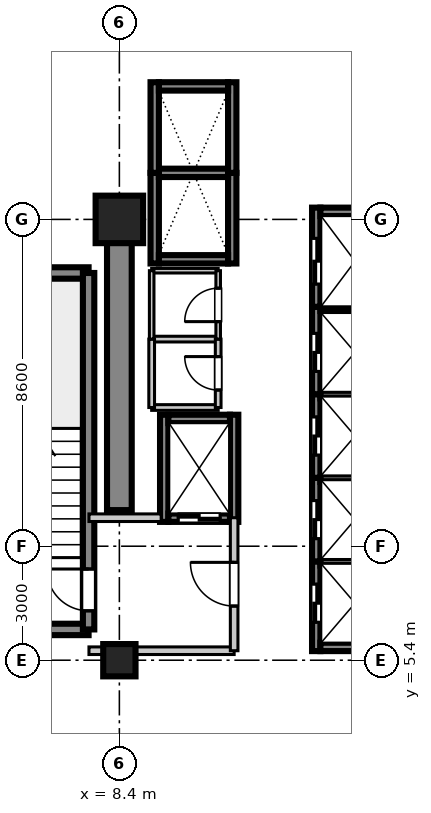
"""IFC4 building model, lengths in metres.
Left out: names, types, materials, properties, quantities, classifications, styles, units other than length and angle.
Written with IfcOpenShell. Run it as: python <this file> out.ifc"""

import sys

from ifc_helpers import new_model, si_unit, direction, frame, frame_2d, origin, origin_2d, place, context, subcontext, project, spatial, rectangle, extrude, source, transform, mapped, element, fill, save


model = new_model("IFC4")
c1 = context("Model", 3, precision=1e-05, world=origin(), true_north=direction((0.0, 1.0)))
c2 = subcontext(c1, "Body", "Model", "MODEL_VIEW")
j1 = project(units=[si_unit("LENGTHUNIT", "METRE"), si_unit("PLANEANGLEUNIT", "RADIAN")], contexts=[c1])
p1 = place(None, origin())
s1 = spatial("IfcSite", under=j1, at=p1, CompositionType="ELEMENT")
p2 = place(p1, origin())
s2 = spatial("IfcBuilding", under=s1, at=p2, CompositionType="ELEMENT")
p3 = place(p2, frame((0.0, 0.0, 117.5)))
s3 = spatial("IfcBuildingStorey", under=s2, at=p3, CompositionType="ELEMENT", Elevation=117.5)
m1 = source(origin(), c2, "Body", "SweptSolid", [
    extrude(rectangle(XDim=0.85, YDim=0.85, at=origin_2d()), origin(), (0.0, 0.0, 1.0), 3.605),
])
p4 = place(p3, frame((8.4, 5.4, 0.0), z_axis=(0.0, 0.0, 1.0), x_axis=(1.0, 0.0, 0.0)))
e1 = element("IfcColumn", 1, at=p4, inside=s3, PredefinedType="PILASTER", context=c2, shape_type="MappedRepresentation", body=[
    mapped(m1, transform((0.0, 0.0, 0.0), scale=1.0)),
])
m2 = source(origin(), c2, "Body", "SweptSolid", [
    extrude(rectangle(XDim=1.25, YDim=1.25, at=origin_2d()), origin(), (0.0, 0.0, 1.0), 3.605),
])
p5 = place(p3, frame((8.4, 17.0, 0.0), z_axis=(0.0, 0.0, 1.0), x_axis=(1.0, 0.0, 0.0)))
e2 = element("IfcColumn", 2, at=p5, inside=s3, PredefinedType="COLUMN", context=c2, shape_type="MappedRepresentation", body=[
    mapped(m2, transform((0.0, 0.0, 0.0), scale=1.0)),
])
m3 = source(origin(), c2, "Body", "SweptSolid", [
    extrude(rectangle(XDim=7.65, YDim=0.65, at=frame_2d((3.825, 0.0))), origin(), (0.0, 0.0, 1.0), 3.38),
])
p6 = place(p3, frame((8.4, 9.35, 0.0), z_axis=(0.0, 0.0, 1.0), x_axis=(0.0, 1.0, 0.0)))
e3 = element("IfcWall", 3, at=p6, inside=s3, PredefinedType="SHEAR", context=c2, shape_type="MappedRepresentation", body=[
    mapped(m3, transform((0.0, 0.0, 0.0), scale=1.0)),
])
m4 = source(origin(), c2, "Body", "SweptSolid", [
    extrude(rectangle(XDim=3.98, YDim=0.3, at=frame_2d((1.99, 0.0))), origin(), (0.0, 0.0, 1.0), 3.38),
])
for number, where, z_axis, x_axis in (
    (4, (3.61, 6.21, 0.0), (0.0, 0.0, 1.0), (1.0, 0.0, 0.0)),
    (5, (3.61, 15.59, 0.0), (0.0, 0.0, 1.0), (1.0, 0.0, 0.0)),
):
    element("IfcWall", number, at=place(p3, frame(where, z_axis=z_axis, x_axis=x_axis)), inside=s3, PredefinedType="SHEAR", context=c2, shape_type="MappedRepresentation", body=[
        mapped(m4, transform((0.0, 0.0, 0.0), scale=1.0)),
    ])
m5 = source(origin(), c2, "Body", "SweptSolid", [
    extrude(rectangle(XDim=9.38, YDim=0.3, at=frame_2d((4.69, 0.0))), origin(), (0.0, 0.0, 1.0), 3.38),
])
p7 = place(p3, frame((7.59, 6.21, 0.0), z_axis=(0.0, 0.0, 1.0), x_axis=(0.0, 1.0, 0.0)))
e6 = element("IfcWall", 6, at=p7, inside=s3, PredefinedType="SHEAR", context=c2, shape_type="MappedRepresentation", body=[
    mapped(m5, transform((0.0, 0.0, 0.0), scale=1.0)),
])
p8 = place(p7, frame((0.49, 0.0, 0.0)))
e7 = element("IfcOpeningElement", 7, at=p8, cuts=e6, PredefinedType="OPENING", context=c2, shape_type="SweptSolid", body=[
    extrude(rectangle(XDim=1.1, YDim=2.15, at=frame_2d((0.55, 1.075))), frame((0.0, 0.16, 0.0), z_axis=(0.0, -1.0, 0.0), x_axis=(1.0, 0.0, 0.0)), (0.0, 0.0, 1.0), 0.32),
])
m6 = source(origin(), c2, "Body", "SweptSolid", [
    extrude(rectangle(XDim=2.36, YDim=0.22, at=frame_2d((1.18, 0.0))), origin(), (0.0, 0.0, 1.0), 3.38),
])
p9 = place(p3, frame((13.58, 5.64, 0.0), z_axis=(0.0, 0.0, 1.0), x_axis=(0.0, 1.0, 0.0)))
e8 = element("IfcWall", 8, at=p9, inside=s3, PredefinedType="SHEAR", context=c2, shape_type="MappedRepresentation", body=[
    mapped(m6, transform((0.0, 0.0, 0.0), scale=1.0)),
])
p10 = place(p9, frame((0.76, 0.0, 0.0)))
e9 = element("IfcOpeningElement", 9, at=p10, cuts=e8, PredefinedType="OPENING", context=c2, shape_type="SweptSolid", body=[
    extrude(rectangle(XDim=1.0, YDim=2.2, at=frame_2d((0.5, 1.1))), frame((0.0, 0.12, 0.0), z_axis=(0.0, -1.0, 0.0), x_axis=(1.0, 0.0, 0.0)), (0.0, 0.0, 1.0), 0.24),
])
m7 = source(origin(), c2, "Body", "SweptSolid", [
    extrude(rectangle(XDim=1.82, YDim=0.22, at=frame_2d((0.91, 0.0))), origin(), (0.0, 0.0, 1.0), 3.38),
])
p11 = place(p3, frame((13.69, 5.75, 0.0), z_axis=(0.0, 0.0, 1.0), x_axis=(1.0, 0.0, 0.0)))
e10 = element("IfcWall", 10, at=p11, inside=s3, PredefinedType="SHEAR", context=c2, shape_type="MappedRepresentation", body=[
    mapped(m7, transform((0.0, 0.0, 0.0), scale=1.0)),
])
m8 = source(origin(), c2, "Body", "SweptSolid", [
    extrude(rectangle(XDim=1.82, YDim=0.22, at=frame_2d((0.91, 0.0))), origin(), (0.0, 0.0, 1.0), 3.65),
])
p12 = place(p3, frame((13.69, 8.0, 0.0), z_axis=(0.0, 0.0, 1.0), x_axis=(1.0, 0.0, 0.0)))
e11 = element("IfcWall", 11, at=p12, inside=s3, PredefinedType="SHEAR", context=c2, shape_type="MappedRepresentation", body=[
    mapped(m8, transform((0.0, 0.0, 0.0), scale=1.0)),
])
m9 = source(origin(), c2, "Body", "SweptSolid", [
    extrude(rectangle(XDim=2.2, YDim=0.22, at=frame_2d((1.1, 0.0))), origin(), (0.0, 0.0, 1.0), 3.38),
])
p13 = place(p3, frame((13.58, 8.0, 0.0), z_axis=(0.0, 0.0, 1.0), x_axis=(0.0, 1.0, 0.0)))
e12 = element("IfcWall", 12, at=p13, inside=s3, PredefinedType="SHEAR", context=c2, shape_type="MappedRepresentation", body=[
    mapped(m9, transform((0.0, 0.0, 0.0), scale=1.0)),
])
p14 = place(p13, frame((0.6, 0.0, 0.0)))
e13 = element("IfcOpeningElement", 13, at=p14, cuts=e12, PredefinedType="OPENING", context=c2, shape_type="SweptSolid", body=[
    extrude(rectangle(XDim=1.0, YDim=2.2, at=frame_2d((0.5, 1.1))), frame((0.0, 0.12, 0.0), z_axis=(0.0, -1.0, 0.0), x_axis=(1.0, 0.0, 0.0)), (0.0, 0.0, 1.0), 0.24),
])
p15 = place(p3, frame((13.69, 10.2, 0.0), z_axis=(0.0, 0.0, 1.0), x_axis=(1.0, 0.0, 0.0)))
e14 = element("IfcWall", 14, at=p15, inside=s3, PredefinedType="SHEAR", context=c2, shape_type="MappedRepresentation", body=[
    mapped(m8, transform((0.0, 0.0, 0.0), scale=1.0)),
])
p16 = place(p3, frame((13.58, 10.2, 0.0), z_axis=(0.0, 0.0, 1.0), x_axis=(0.0, 1.0, 0.0)))
e15 = element("IfcWall", 15, at=p16, inside=s3, PredefinedType="SHEAR", context=c2, shape_type="MappedRepresentation", body=[
    mapped(m9, transform((0.0, 0.0, 0.0), scale=1.0)),
])
p17 = place(p16, frame((0.6, 0.0, 0.0)))
e16 = element("IfcOpeningElement", 16, at=p17, cuts=e15, PredefinedType="OPENING", context=c2, shape_type="SweptSolid", body=[
    extrude(rectangle(XDim=1.0, YDim=2.2, at=frame_2d((0.5, 1.1))), frame((0.0, 0.12, 0.0), z_axis=(0.0, -1.0, 0.0), x_axis=(1.0, 0.0, 0.0)), (0.0, 0.0, 1.0), 0.24),
])
p18 = place(p3, frame((13.69, 12.4, 0.0), z_axis=(0.0, 0.0, 1.0), x_axis=(1.0, 0.0, 0.0)))
e17 = element("IfcWall", 17, at=p18, inside=s3, PredefinedType="SHEAR", context=c2, shape_type="MappedRepresentation", body=[
    mapped(m8, transform((0.0, 0.0, 0.0), scale=1.0)),
])
m10 = source(origin(), c2, "Body", "SweptSolid", [
    extrude(rectangle(XDim=2.3, YDim=0.22, at=frame_2d((1.15, 0.0))), origin(), (0.0, 0.0, 1.0), 3.38),
])
p19 = place(p3, frame((13.58, 12.4, 0.0), z_axis=(0.0, 0.0, 1.0), x_axis=(0.0, 1.0, 0.0)))
e18 = element("IfcWall", 18, at=p19, inside=s3, PredefinedType="SHEAR", context=c2, shape_type="MappedRepresentation", body=[
    mapped(m10, transform((0.0, 0.0, 0.0), scale=1.0)),
])
p20 = place(p19, frame((0.6, 0.0, 0.0)))
e19 = element("IfcOpeningElement", 19, at=p20, cuts=e18, PredefinedType="OPENING", context=c2, shape_type="SweptSolid", body=[
    extrude(rectangle(XDim=1.0, YDim=2.2, at=frame_2d((0.5, 1.1))), frame((0.0, 0.12, 0.0), z_axis=(0.0, -1.0, 0.0), x_axis=(1.0, 0.0, 0.0)), (0.0, 0.0, 1.0), 0.24),
])
p21 = place(p3, frame((13.69, 14.7, 0.0), z_axis=(0.0, 0.0, 1.0), x_axis=(1.0, 0.0, 0.0)))
e20 = element("IfcWall", 20, at=p21, inside=s3, PredefinedType="SHEAR", context=c2, shape_type="MappedRepresentation", body=[
    mapped(m8, transform((0.0, 0.0, 0.0), scale=1.0)),
])
m11 = source(origin(), c2, "Body", "SweptSolid", [
    extrude(rectangle(XDim=2.385, YDim=0.22, at=frame_2d((1.192, 0.0))), origin(), (0.0, 0.0, 1.0), 3.38),
])
for number, where, z_axis, x_axis in (
    (21, (9.33, 15.84, 0.0), (0.0, 0.0, 1.0), (0.0, 1.0, 0.0)),
    (22, (11.37, 15.84, 0.0), (0.0, 0.0, 1.0), (0.0, 1.0, 0.0)),
):
    element("IfcWall", number, at=place(p3, frame(where, z_axis=z_axis, x_axis=x_axis)), inside=s3, PredefinedType="SHEAR", context=c2, shape_type="MappedRepresentation", body=[
        mapped(m11, transform((0.0, 0.0, 0.0), scale=1.0)),
    ])
p22 = place(p3, frame((9.44, 15.95, 0.0), z_axis=(0.0, 0.0, 1.0), x_axis=(1.0, 0.0, 0.0)))
e23 = element("IfcWall", 23, at=p22, inside=s3, PredefinedType="SHEAR", context=c2, shape_type="MappedRepresentation", body=[
    mapped(m7, transform((0.0, 0.0, 0.0), scale=1.0)),
])
p23 = place(p3, frame((9.44, 18.225, 0.0), z_axis=(0.0, 0.0, 1.0), x_axis=(1.0, 0.0, 0.0)))
e24 = element("IfcWall", 24, at=p23, inside=s3, PredefinedType="SHEAR", context=c2, shape_type="MappedRepresentation", body=[
    mapped(m8, transform((0.0, 0.0, 0.0), scale=1.0)),
])
for number, where, z_axis, x_axis in (
    (25, (9.33, 18.225, 0.0), (0.0, 0.0, 1.0), (0.0, 1.0, 0.0)),
    (26, (11.37, 18.225, 0.0), (0.0, 0.0, 1.0), (0.0, 1.0, 0.0)),
):
    element("IfcWall", number, at=place(p3, frame(where, z_axis=z_axis, x_axis=x_axis)), inside=s3, PredefinedType="SHEAR", context=c2, shape_type="MappedRepresentation", body=[
        mapped(m11, transform((0.0, 0.0, 0.0), scale=1.0)),
    ])
p24 = place(p3, frame((9.44, 20.5, 0.0), z_axis=(0.0, 0.0, 1.0), x_axis=(1.0, 0.0, 0.0)))
e27 = element("IfcWall", 27, at=p24, inside=s3, PredefinedType="SHEAR", context=c2, shape_type="MappedRepresentation", body=[
    mapped(m7, transform((0.0, 0.0, 0.0), scale=1.0)),
])
m12 = source(origin(), c2, "Body", "SweptSolid", [
    extrude(rectangle(XDim=2.82, YDim=0.22, at=frame_2d((1.41, 0.0))), origin(), (0.0, 0.0, 1.0), 3.38),
])
for number, where, z_axis, x_axis in (
    (28, (9.58, 9.04, 0.0), (0.0, 0.0, 1.0), (0.0, 1.0, 0.0)),
    (29, (11.42, 9.04, 0.0), (0.0, 0.0, 1.0), (0.0, 1.0, 0.0)),
):
    element("IfcWall", number, at=place(p3, frame(where, z_axis=z_axis, x_axis=x_axis)), inside=s3, PredefinedType="SHEAR", context=c2, shape_type="MappedRepresentation", body=[
        mapped(m12, transform((0.0, 0.0, 0.0), scale=1.0)),
    ])
m13 = source(origin(), c2, "Body", "SweptSolid", [
    extrude(rectangle(XDim=1.62, YDim=0.22, at=frame_2d((0.81, 0.0))), origin(), (0.0, 0.0, 1.0), 3.38),
])
p25 = place(p3, frame((9.69, 9.15, 0.0), z_axis=(0.0, 0.0, 1.0), x_axis=(1.0, 0.0, 0.0)))
e30 = element("IfcWall", 30, at=p25, inside=s3, PredefinedType="SHEAR", context=c2, shape_type="MappedRepresentation", body=[
    mapped(m13, transform((0.0, 0.0, 0.0), scale=1.0)),
])
p26 = place(p25, frame((0.26, 0.0, 0.0)))
e31 = element("IfcOpeningElement", 31, at=p26, cuts=e30, PredefinedType="OPENING", context=c2, shape_type="SweptSolid", body=[
    extrude(rectangle(XDim=1.1, YDim=2.2, at=frame_2d((0.55, 1.1))), frame((0.0, 0.12, 0.0), z_axis=(0.0, -1.0, 0.0), x_axis=(1.0, 0.0, 0.0)), (0.0, 0.0, 1.0), 0.24),
])
p27 = place(p3, frame((9.69, 11.75, 0.0), z_axis=(0.0, 0.0, 1.0), x_axis=(1.0, 0.0, 0.0)))
e32 = element("IfcWall", 32, at=p27, inside=s3, PredefinedType="SHEAR", context=c2, shape_type="MappedRepresentation", body=[
    mapped(m13, transform((0.0, 0.0, 0.0), scale=1.0)),
])
m14 = source(origin(), c2, "Body", "SweptSolid", [
    extrude(rectangle(XDim=2.61, YDim=0.22, at=frame_2d((1.305, 0.0))), origin(), (0.0, 0.0, 1.0), 3.38),
])
p28 = place(p3, frame((13.58, 14.7, 0.0), z_axis=(0.0, 0.0, 1.0), x_axis=(0.0, 1.0, 0.0)))
e33 = element("IfcWall", 33, at=p28, inside=s3, PredefinedType="SHEAR", context=c2, shape_type="MappedRepresentation", body=[
    mapped(m14, transform((0.0, 0.0, 0.0), scale=1.0)),
])
p29 = place(p28, frame((0.6, 0.0, 0.0)))
e34 = element("IfcOpeningElement", 34, at=p29, cuts=e33, PredefinedType="OPENING", context=c2, shape_type="SweptSolid", body=[
    extrude(rectangle(XDim=1.2, YDim=2.2, at=frame_2d((0.6, 1.1))), frame((0.0, 0.12, 0.0), z_axis=(0.0, -1.0, 0.0), x_axis=(1.0, 0.0, 0.0)), (0.0, 0.0, 1.0), 0.24),
])
p30 = place(p3, frame((13.69, 17.2, 0.0), z_axis=(0.0, 0.0, 1.0), x_axis=(1.0, 0.0, 0.0)))
e35 = element("IfcWall", 35, at=p30, inside=s3, PredefinedType="SHEAR", context=c2, shape_type="MappedRepresentation", body=[
    mapped(m7, transform((0.0, 0.0, 0.0), scale=1.0)),
])
m15 = source(origin(), c2, "Body", "SweptSolid", [
    extrude(rectangle(XDim=3.82, YDim=0.2, at=frame_2d((1.91, 0.0))), origin(), (0.0, 0.0, 1.0), 2.72),
])
p31 = place(p3, frame((7.6, 5.65, 0.0), z_axis=(0.0, 0.0, 1.0), x_axis=(1.0, 0.0, 0.0)))
e36 = element("IfcWall", 36, at=p31, inside=s3, PredefinedType="PARTITIONING", context=c2, shape_type="MappedRepresentation", body=[
    mapped(m15, transform((0.0, 0.0, 0.0), scale=1.0)),
])
m16 = source(origin(), c2, "Body", "SweptSolid", [
    extrude(rectangle(XDim=1.9, YDim=0.2, at=frame_2d((0.95, 0.0))), origin(), (0.0, 0.0, 1.0), 2.72),
])
p32 = place(p3, frame((7.6, 9.15, 0.0), z_axis=(0.0, 0.0, 1.0), x_axis=(1.0, 0.0, 0.0)))
e37 = element("IfcWall", 37, at=p32, inside=s3, PredefinedType="PARTITIONING", context=c2, shape_type="MappedRepresentation", body=[
    mapped(m16, transform((0.0, 0.0, 0.0), scale=1.0)),
])
m17 = source(origin(), c2, "Body", "SweptSolid", [
    extrude(rectangle(XDim=3.5, YDim=0.2, at=frame_2d((1.75, 0.0))), origin(), (0.0, 0.0, 1.0), 2.72),
])
p33 = place(p3, frame((11.42, 5.65, 0.0), z_axis=(0.0, 0.0, 1.0), x_axis=(0.0, 1.0, 0.0)))
e38 = element("IfcWall", 38, at=p33, inside=s3, PredefinedType="PARTITIONING", context=c2, shape_type="MappedRepresentation", body=[
    mapped(m17, transform((0.0, 0.0, 0.0), scale=1.0)),
])
p34 = place(p33, frame((1.175, 0.0, 0.0)))
e39 = element("IfcOpeningElement", 39, at=p34, cuts=e38, PredefinedType="OPENING", context=c2, shape_type="SweptSolid", body=[
    extrude(rectangle(XDim=1.15, YDim=2.15, at=frame_2d((0.575, 1.075))), frame((0.0, 0.11, 0.0), z_axis=(0.0, -1.0, 0.0), x_axis=(1.0, 0.0, 0.0)), (0.0, 0.0, 1.0), 0.22),
])
m18 = source(origin(), c2, "Body", "SweptSolid", [
    extrude(rectangle(XDim=1.75, YDim=0.15, at=frame_2d((0.875, 0.0))), origin(), (0.0, 0.0, 1.0), 2.72),
])
for number, where, z_axis, x_axis in (
    (40, (9.25, 12.05, 0.0), (0.0, 0.0, 1.0), (1.0, 0.0, 0.0)),
    (41, (9.25, 13.85, 0.0), (0.0, 0.0, 1.0), (1.0, 0.0, 0.0)),
):
    element("IfcWall", number, at=place(p3, frame(where, z_axis=z_axis, x_axis=x_axis)), inside=s3, PredefinedType="PARTITIONING", context=c2, shape_type="MappedRepresentation", body=[
        mapped(m18, transform((0.0, 0.0, 0.0), scale=1.0)),
    ])
m19 = source(origin(), c2, "Body", "SweptSolid", [
    extrude(rectangle(XDim=1.8, YDim=0.15, at=frame_2d((0.9, 0.0))), origin(), (0.0, 0.0, 1.0), 2.72),
])
p35 = place(p3, frame((9.25, 12.05, 0.0), z_axis=(0.0, 0.0, 1.0), x_axis=(0.0, 1.0, 0.0)))
e42 = element("IfcWall", 42, at=p35, inside=s3, PredefinedType="PARTITIONING", context=c2, shape_type="MappedRepresentation", body=[
    mapped(m19, transform((0.0, 0.0, 0.0), scale=1.0)),
])
p36 = place(p3, frame((11.0, 12.05, 0.0), z_axis=(0.0, 0.0, 1.0), x_axis=(0.0, 1.0, 0.0)))
e43 = element("IfcWall", 43, at=p36, inside=s3, PredefinedType="PARTITIONING", context=c2, shape_type="MappedRepresentation", body=[
    mapped(m19, transform((0.0, 0.0, 0.0), scale=1.0)),
])
p37 = place(p36, frame((0.46, 0.0, 0.0)))
e44 = element("IfcOpeningElement", 44, at=p37, cuts=e43, PredefinedType="OPENING", context=c2, shape_type="SweptSolid", body=[
    extrude(rectangle(XDim=0.88, YDim=2.1, at=frame_2d((0.44, 1.05))), frame((0.0, 0.085, 0.0), z_axis=(0.0, -1.0, 0.0), x_axis=(1.0, 0.0, 0.0)), (0.0, 0.0, 1.0), 0.17),
])
m20 = source(origin(), c2, "Body", "SweptSolid", [
    extrude(rectangle(XDim=1.75, YDim=0.12, at=frame_2d((0.875, 0.0))), origin(), (0.0, 0.0, 1.0), 2.72),
])
p38 = place(p3, frame((9.25, 15.65, 0.0), z_axis=(0.0, 0.0, 1.0), x_axis=(1.0, 0.0, 0.0)))
e45 = element("IfcWall", 45, at=p38, inside=s3, PredefinedType="PARTITIONING", context=c2, shape_type="MappedRepresentation", body=[
    mapped(m20, transform((0.0, 0.0, 0.0), scale=1.0)),
])
m21 = source(origin(), c2, "Body", "SweptSolid", [
    extrude(rectangle(XDim=1.8, YDim=0.12, at=frame_2d((0.9, 0.0))), origin(), (0.0, 0.0, 1.0), 2.72),
])
p39 = place(p3, frame((9.25, 13.85, 0.0), z_axis=(0.0, 0.0, 1.0), x_axis=(0.0, 1.0, 0.0)))
e46 = element("IfcWall", 46, at=p39, inside=s3, PredefinedType="PARTITIONING", context=c2, shape_type="MappedRepresentation", body=[
    mapped(m21, transform((0.0, 0.0, 0.0), scale=1.0)),
])
p40 = place(p3, frame((11.0, 13.85, 0.0), z_axis=(0.0, 0.0, 1.0), x_axis=(0.0, 1.0, 0.0)))
e47 = element("IfcWall", 47, at=p40, inside=s3, PredefinedType="PARTITIONING", context=c2, shape_type="MappedRepresentation", body=[
    mapped(m21, transform((0.0, 0.0, 0.0), scale=1.0)),
])
p41 = place(p40, frame((0.46, 0.0, 0.0)))
e48 = element("IfcOpeningElement", 48, at=p41, cuts=e47, PredefinedType="OPENING", context=c2, shape_type="SweptSolid", body=[
    extrude(rectangle(XDim=0.88, YDim=2.1, at=frame_2d((0.44, 1.05))), frame((0.0, 0.07, 0.0), z_axis=(0.0, -1.0, 0.0), x_axis=(1.0, 0.0, 0.0)), (0.0, 0.0, 1.0), 0.14),
])
m22 = source(origin(), c2, "Body", "SweptSolid", [
    extrude(rectangle(XDim=1.1, YDim=2.15, at=frame_2d((0.55, 1.075))), frame((0.0, 0.025, 0.0), z_axis=(0.0, -1.0, 0.0), x_axis=(1.0, 0.0, 0.0)), (0.0, 0.0, 1.0), 0.05),
])
p42 = place(p8, origin())
e49 = element("IfcDoor", 49, at=p42, inside=s3, OperationType="SINGLE_SWING_RIGHT", PredefinedType="DOOR", context=c2, shape_type="MappedRepresentation", body=[
    mapped(m22, transform((0.0, 0.0, 0.0), scale=1.0)),
])
fill(e7, e49)
m23 = source(origin(), c2, "Body", "SweptSolid", [
    extrude(rectangle(XDim=1.0, YDim=2.2, at=frame_2d((0.5, 1.1))), frame((0.0, 0.025, 0.0), z_axis=(0.0, -1.0, 0.0), x_axis=(1.0, 0.0, 0.0)), (0.0, 0.0, 1.0), 0.05),
])
p43 = place(p10, origin())
e50 = element("IfcDoor", 50, at=p43, inside=s3, OperationType="DOUBLE_DOOR_SLIDING", PredefinedType="DOOR", context=c2, shape_type="MappedRepresentation", body=[
    mapped(m23, transform((0.0, 0.0, 0.0), scale=1.0)),
])
fill(e9, e50)
p44 = place(p14, origin())
e51 = element("IfcDoor", 51, at=p44, inside=s3, OperationType="DOUBLE_DOOR_SLIDING", PredefinedType="DOOR", context=c2, shape_type="MappedRepresentation", body=[
    mapped(m23, transform((0.0, 0.0, 0.0), scale=1.0)),
])
fill(e13, e51)
p45 = place(p17, origin())
e52 = element("IfcDoor", 52, at=p45, inside=s3, OperationType="DOUBLE_DOOR_SLIDING", PredefinedType="DOOR", context=c2, shape_type="MappedRepresentation", body=[
    mapped(m23, transform((0.0, 0.0, 0.0), scale=1.0)),
])
fill(e16, e52)
p46 = place(p20, origin())
e53 = element("IfcDoor", 53, at=p46, inside=s3, OperationType="DOUBLE_DOOR_SLIDING", PredefinedType="DOOR", context=c2, shape_type="MappedRepresentation", body=[
    mapped(m23, transform((0.0, 0.0, 0.0), scale=1.0)),
])
fill(e19, e53)
m24 = source(origin(), c2, "Body", "SweptSolid", [
    extrude(rectangle(XDim=1.1, YDim=2.2, at=frame_2d((0.55, 1.1))), frame((0.0, 0.025, 0.0), z_axis=(0.0, -1.0, 0.0), x_axis=(1.0, 0.0, 0.0)), (0.0, 0.0, 1.0), 0.05),
])
p47 = place(p26, frame((1.1, 0.0, 0.0), z_axis=(0.0, 0.0, 1.0), x_axis=(-1.0, 0.0, 0.0)))
e54 = element("IfcDoor", 54, at=p47, inside=s3, OperationType="DOUBLE_DOOR_SLIDING", PredefinedType="DOOR", context=c2, shape_type="MappedRepresentation", body=[
    mapped(m24, transform((0.0, 0.0, 0.0), scale=1.0)),
])
fill(e31, e54)
m25 = source(origin(), c2, "Body", "SweptSolid", [
    extrude(rectangle(XDim=1.2, YDim=2.2, at=frame_2d((0.6, 1.1))), frame((0.0, 0.025, 0.0), z_axis=(0.0, -1.0, 0.0), x_axis=(1.0, 0.0, 0.0)), (0.0, 0.0, 1.0), 0.05),
])
p48 = place(p29, origin())
e55 = element("IfcDoor", 55, at=p48, inside=s3, OperationType="DOUBLE_DOOR_SLIDING", PredefinedType="DOOR", context=c2, shape_type="MappedRepresentation", body=[
    mapped(m25, transform((0.0, 0.0, 0.0), scale=1.0)),
])
fill(e34, e55)
m26 = source(origin(), c2, "Body", "SweptSolid", [
    extrude(rectangle(XDim=1.15, YDim=2.15, at=frame_2d((0.575, 1.075))), frame((0.0, 0.025, 0.0), z_axis=(0.0, -1.0, 0.0), x_axis=(1.0, 0.0, 0.0)), (0.0, 0.0, 1.0), 0.05),
])
p49 = place(p34, frame((1.15, 0.0, 0.0), z_axis=(0.0, 0.0, 1.0), x_axis=(-1.0, 0.0, 0.0)))
e56 = element("IfcDoor", 56, at=p49, inside=s3, OperationType="SINGLE_SWING_RIGHT", PredefinedType="DOOR", context=c2, shape_type="MappedRepresentation", body=[
    mapped(m26, transform((0.0, 0.0, 0.0), scale=1.0)),
])
fill(e39, e56)
m27 = source(origin(), c2, "Body", "SweptSolid", [
    extrude(rectangle(XDim=0.88, YDim=2.1, at=frame_2d((0.44, 1.05))), frame((0.0, 0.025, 0.0), z_axis=(0.0, -1.0, 0.0), x_axis=(1.0, 0.0, 0.0)), (0.0, 0.0, 1.0), 0.05),
])
p50 = place(p37, origin())
e57 = element("IfcDoor", 57, at=p50, inside=s3, OperationType="SINGLE_SWING_RIGHT", PredefinedType="DOOR", context=c2, shape_type="MappedRepresentation", body=[
    mapped(m27, transform((0.0, 0.0, 0.0), scale=1.0)),
])
fill(e44, e57)
p51 = place(p41, origin())
e58 = element("IfcDoor", 58, at=p51, inside=s3, OperationType="SINGLE_SWING_LEFT", PredefinedType="DOOR", context=c2, shape_type="MappedRepresentation", body=[
    mapped(m27, transform((0.0, 0.0, 0.0), scale=1.0)),
])
fill(e48, e58)
save(model, sys.argv[1])
